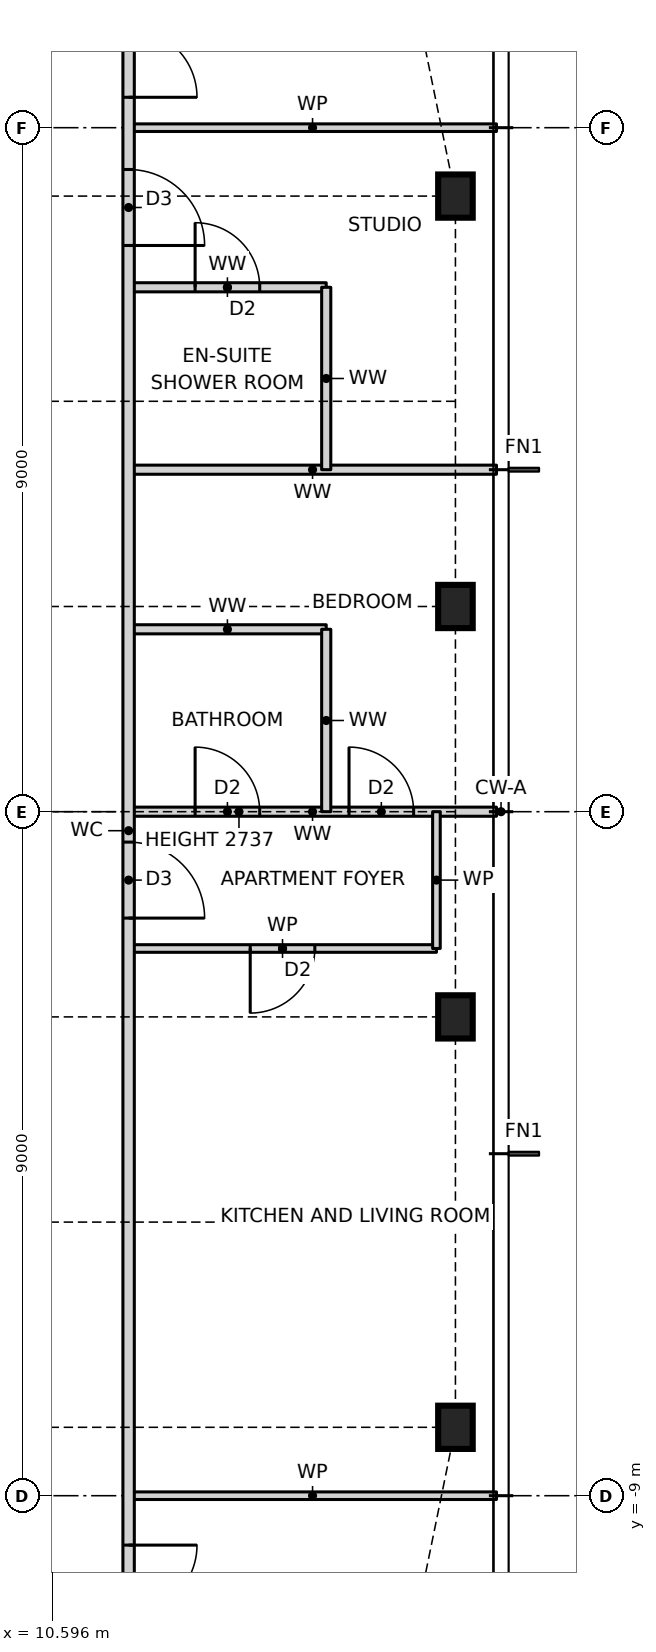
"""IFC4 building model, lengths in metres.
Left out: names, types, materials, properties, quantities, classifications, styles, units other than length and angle.
Written with IfcOpenShell. Run it as: python <this file> out.ifc"""

import sys

from ifc_helpers import new_model, si_unit, direction, frame, frame_2d, origin, origin_2d, place, context, subcontext, project, spatial, rectangle, i_section, extrude, element, fill, save


model = new_model("IFC4")
c1 = context("Model", 3, precision=1e-05, world=origin(), true_north=direction((0.0, 1.0)))
c2 = subcontext(c1, "Body", "Model", "MODEL_VIEW")
j1 = project(units=[si_unit("LENGTHUNIT", "METRE"), si_unit("PLANEANGLEUNIT", "RADIAN")], contexts=[c1])
p1 = place(None, origin())
s1 = spatial("IfcSite", under=j1, at=p1, CompositionType="ELEMENT")
p2 = place(p1, origin())
s2 = spatial("IfcBuilding", under=s1, at=p2, CompositionType="ELEMENT")
p3 = place(p2, frame((0.0, 0.0, 229.0)))
s3 = spatial("IfcBuildingStorey", under=s2, at=p3, CompositionType="ELEMENT", Elevation=229.0)
for number, where, z_axis, x_axis in (
    (1, (15.9, -8.1, 0.0), (0.0, 0.0, 1.0), (1.0, 0.0, 0.0)),
    (2, (15.9, -2.7, 0.0), (0.0, 0.0, 1.0), (1.0, 0.0, 0.0)),
    (3, (15.9, 2.7, 0.0), (0.0, 0.0, 1.0), (1.0, 0.0, 0.0)),
    (4, (15.9, 8.1, 0.0), (0.0, 0.0, 1.0), (1.0, 0.0, 0.0)),
):
    element("IfcColumn", number, at=place(p3, frame(where, z_axis=z_axis, x_axis=x_axis)), inside=s3, PredefinedType="COLUMN", context=c2, shape_type="SweptSolid", body=[
        extrude(i_section(OverallWidth=0.455, OverallDepth=0.569, WebThickness=0.078, FlangeThickness=0.125, at=origin_2d()), origin(), (0.0, 0.0, 1.0), 3.5),
    ])
p4 = place(p3, frame((11.6, -9.0, 0.0), z_axis=(0.0, 0.0, 1.0), x_axis=(1.0, 0.0, 0.0)))
e5 = element("IfcWall", 5, at=p4, inside=s3, PredefinedType="PARTITIONING", context=c2, shape_type="SweptSolid", body=[
    extrude(rectangle(XDim=4.84, YDim=0.1, at=frame_2d((2.42, 0.0))), origin(), (0.0, 0.0, 1.0), 3.27),
])
p5 = place(p3, frame((11.6, -1.8, 0.0), z_axis=(0.0, 0.0, 1.0), x_axis=(1.0, 0.0, 0.0)))
e6 = element("IfcWall", 6, at=p5, inside=s3, PredefinedType="PARTITIONING", context=c2, shape_type="SweptSolid", body=[
    extrude(rectangle(XDim=4.05, YDim=0.1, at=frame_2d((2.025, 0.0))), origin(), (0.0, 0.0, 1.0), 3.27),
])
p6 = place(p5, frame((1.6, 0.0, 0.0)))
e7 = element("IfcOpeningElement", 7, at=p6, cuts=e6, PredefinedType="OPENING", context=c2, shape_type="SweptSolid", body=[
    extrude(rectangle(XDim=0.85, YDim=2.1, at=frame_2d((0.425, 1.05))), frame((0.0, 0.06, 0.0), z_axis=(0.0, -1.0, 0.0), x_axis=(1.0, 0.0, 0.0)), (0.0, 0.0, 1.0), 0.12),
])
p7 = place(p3, frame((11.6, 0.0, 0.0), z_axis=(0.0, 0.0, 1.0), x_axis=(1.0, 0.0, 0.0)))
e8 = element("IfcWall", 8, at=p7, inside=s3, PredefinedType="PARTITIONING", context=c2, shape_type="SweptSolid", body=[
    extrude(rectangle(XDim=4.84, YDim=0.12, at=frame_2d((2.42, 0.0))), origin(), (0.0, 0.0, 1.0), 2.737),
])
p8 = place(p7, frame((2.9, 0.0, 0.0)))
e9 = element("IfcOpeningElement", 9, at=p8, cuts=e8, PredefinedType="OPENING", context=c2, shape_type="SweptSolid", body=[
    extrude(rectangle(XDim=0.85, YDim=2.1, at=frame_2d((0.425, 1.05))), frame((0.0, 0.07, 0.0), z_axis=(0.0, -1.0, 0.0), x_axis=(1.0, 0.0, 0.0)), (0.0, 0.0, 1.0), 0.14),
])
p9 = place(p7, frame((0.875, 0.0, 0.0)))
e10 = element("IfcOpeningElement", 10, at=p9, cuts=e8, PredefinedType="OPENING", context=c2, shape_type="SweptSolid", body=[
    extrude(rectangle(XDim=0.85, YDim=2.1, at=frame_2d((0.425, 1.05))), frame((0.0, 0.07, 0.0), z_axis=(0.0, -1.0, 0.0), x_axis=(1.0, 0.0, 0.0)), (0.0, 0.0, 1.0), 0.14),
])
p10 = place(p3, frame((11.6, 2.4, 0.0), z_axis=(0.0, 0.0, 1.0), x_axis=(1.0, 0.0, 0.0)))
e11 = element("IfcWall", 11, at=p10, inside=s3, PredefinedType="PARTITIONING", context=c2, shape_type="SweptSolid", body=[
    extrude(rectangle(XDim=2.6, YDim=0.12, at=frame_2d((1.3, 0.0))), origin(), (0.0, 0.0, 1.0), 3.27),
])
p11 = place(p3, frame((11.6, 4.5, 0.0), z_axis=(0.0, 0.0, 1.0), x_axis=(1.0, 0.0, 0.0)))
e12 = element("IfcWall", 12, at=p11, inside=s3, PredefinedType="PARTITIONING", context=c2, shape_type="SweptSolid", body=[
    extrude(rectangle(XDim=4.84, YDim=0.12, at=frame_2d((2.42, 0.0))), origin(), (0.0, 0.0, 1.0), 3.27),
])
p12 = place(p3, frame((11.6, 6.9, 0.0), z_axis=(0.0, 0.0, 1.0), x_axis=(1.0, 0.0, 0.0)))
e13 = element("IfcWall", 13, at=p12, inside=s3, PredefinedType="PARTITIONING", context=c2, shape_type="SweptSolid", body=[
    extrude(rectangle(XDim=2.6, YDim=0.12, at=frame_2d((1.3, 0.0))), origin(), (0.0, 0.0, 1.0), 3.27),
])
p13 = place(p12, frame((0.875, 0.0, 0.0)))
e14 = element("IfcOpeningElement", 14, at=p13, cuts=e13, PredefinedType="OPENING", context=c2, shape_type="SweptSolid", body=[
    extrude(rectangle(XDim=0.85, YDim=2.1, at=frame_2d((0.425, 1.05))), frame((0.0, 0.07, 0.0), z_axis=(0.0, -1.0, 0.0), x_axis=(1.0, 0.0, 0.0)), (0.0, 0.0, 1.0), 0.14),
])
p14 = place(p3, frame((11.6, 9.0, 0.0), z_axis=(0.0, 0.0, 1.0), x_axis=(1.0, 0.0, 0.0)))
e15 = element("IfcWall", 15, at=p14, inside=s3, PredefinedType="PARTITIONING", context=c2, shape_type="SweptSolid", body=[
    extrude(rectangle(XDim=4.84, YDim=0.1, at=frame_2d((2.42, 0.0))), origin(), (0.0, 0.0, 1.0), 3.27),
])
p15 = place(p3, frame((15.65, -1.8, 0.0), z_axis=(0.0, 0.0, 1.0), x_axis=(0.0, 1.0, 0.0)))
e16 = element("IfcWall", 16, at=p15, inside=s3, PredefinedType="PARTITIONING", context=c2, shape_type="SweptSolid", body=[
    extrude(rectangle(XDim=1.8, YDim=0.1, at=frame_2d((0.9, 0.0))), origin(), (0.0, 0.0, 1.0), 3.27),
])
for number, where, z_axis, x_axis in (
    (17, (14.2, 0.0, 0.0), (0.0, 0.0, 1.0), (0.0, 1.0, 0.0)),
    (18, (14.2, 4.5, 0.0), (0.0, 0.0, 1.0), (0.0, 1.0, 0.0)),
):
    element("IfcWall", number, at=place(p3, frame(where, z_axis=z_axis, x_axis=x_axis)), inside=s3, PredefinedType="PARTITIONING", context=c2, shape_type="SweptSolid", body=[
        extrude(rectangle(XDim=2.4, YDim=0.12, at=frame_2d((1.2, 0.0))), origin(), (0.0, 0.0, 1.0), 3.27),
    ])
p16 = place(p3, frame((11.6, -12.1, 0.0), z_axis=(0.0, 0.0, 1.0), x_axis=(0.0, 1.0, 0.0)))
e19 = element("IfcWall", 19, at=p16, inside=s3, PredefinedType="PARTITIONING", context=c2, shape_type="SweptSolid", body=[
    extrude(rectangle(XDim=23.7, YDim=0.15, at=frame_2d((11.85, 0.0))), origin(), (0.0, 0.0, 1.0), 3.27),
])
p17 = place(p16, frame((10.7, 0.0, 0.0)))
e20 = element("IfcOpeningElement", 20, at=p17, cuts=e19, PredefinedType="OPENING", context=c2, shape_type="SweptSolid", body=[
    extrude(rectangle(XDim=1.0, YDim=2.1, at=frame_2d((0.5, 1.05))), frame((0.0, 0.085, 0.0), z_axis=(0.0, -1.0, 0.0), x_axis=(1.0, 0.0, 0.0)), (0.0, 0.0, 1.0), 0.17),
])
p18 = place(p16, frame((19.55, 0.0, 0.0)))
e21 = element("IfcOpeningElement", 21, at=p18, cuts=e19, PredefinedType="OPENING", context=c2, shape_type="SweptSolid", body=[
    extrude(rectangle(XDim=1.0, YDim=2.1, at=frame_2d((0.5, 1.05))), frame((0.0, 0.085, 0.0), z_axis=(0.0, -1.0, 0.0), x_axis=(1.0, 0.0, 0.0)), (0.0, 0.0, 1.0), 0.17),
])
p19 = place(p16, frame((21.5, 0.0, 0.0)))
e22 = element("IfcOpeningElement", 22, at=p19, cuts=e19, PredefinedType="OPENING", context=c2, shape_type="SweptSolid", body=[
    extrude(rectangle(XDim=1.8, YDim=2.1, at=frame_2d((0.9, 1.05))), frame((0.0, 0.085, 0.0), z_axis=(0.0, -1.0, 0.0), x_axis=(1.0, 0.0, 0.0)), (0.0, 0.0, 1.0), 0.17),
])
p20 = place(p16, frame((0.65, 0.0, 0.0)))
e23 = element("IfcOpeningElement", 23, at=p20, cuts=e19, PredefinedType="OPENING", context=c2, shape_type="SweptSolid", body=[
    extrude(rectangle(XDim=1.8, YDim=2.1, at=frame_2d((0.9, 1.05))), frame((0.0, 0.085, 0.0), z_axis=(0.0, -1.0, 0.0), x_axis=(1.0, 0.0, 0.0)), (0.0, 0.0, 1.0), 0.17),
])
p21 = place(p17, frame((1.0, 0.0, 0.0), z_axis=(0.0, 0.0, 1.0), x_axis=(-1.0, 0.0, 0.0)))
e24 = element("IfcDoor", 24, at=p21, inside=s3, OperationType="SINGLE_SWING_RIGHT", PredefinedType="DOOR", context=c2, shape_type="SweptSolid", body=[
    extrude(rectangle(XDim=1.0, YDim=2.1, at=frame_2d((0.5, 1.05))), frame((0.0, 0.025, 0.0), z_axis=(0.0, -1.0, 0.0), x_axis=(1.0, 0.0, 0.0)), (0.0, 0.0, 1.0), 0.05),
])
fill(e20, e24)
p22 = place(p6, frame((0.85, 0.0, 0.0), z_axis=(0.0, 0.0, 1.0), x_axis=(-1.0, 0.0, 0.0)))
e25 = element("IfcDoor", 25, at=p22, inside=s3, OperationType="SINGLE_SWING_RIGHT", PredefinedType="DOOR", context=c2, shape_type="SweptSolid", body=[
    extrude(rectangle(XDim=0.85, YDim=2.1, at=frame_2d((0.425, 1.05))), frame((0.0, 0.025, 0.0), z_axis=(0.0, -1.0, 0.0), x_axis=(1.0, 0.0, 0.0)), (0.0, 0.0, 1.0), 0.05),
])
fill(e7, e25)
p23 = place(p8, origin())
e26 = element("IfcDoor", 26, at=p23, inside=s3, OperationType="SINGLE_SWING_LEFT", PredefinedType="DOOR", context=c2, shape_type="SweptSolid", body=[
    extrude(rectangle(XDim=0.85, YDim=2.1, at=frame_2d((0.425, 1.05))), frame((0.0, 0.025, 0.0), z_axis=(0.0, -1.0, 0.0), x_axis=(1.0, 0.0, 0.0)), (0.0, 0.0, 1.0), 0.05),
])
fill(e9, e26)
p24 = place(p9, origin())
e27 = element("IfcDoor", 27, at=p24, inside=s3, OperationType="SINGLE_SWING_LEFT", PredefinedType="DOOR", context=c2, shape_type="SweptSolid", body=[
    extrude(rectangle(XDim=0.85, YDim=2.1, at=frame_2d((0.425, 1.05))), frame((0.0, 0.025, 0.0), z_axis=(0.0, -1.0, 0.0), x_axis=(1.0, 0.0, 0.0)), (0.0, 0.0, 1.0), 0.05),
])
fill(e10, e27)
p25 = place(p18, frame((1.0, 0.0, 0.0), z_axis=(0.0, 0.0, 1.0), x_axis=(-1.0, 0.0, 0.0)))
e28 = element("IfcDoor", 28, at=p25, inside=s3, OperationType="SINGLE_SWING_RIGHT", PredefinedType="DOOR", context=c2, shape_type="SweptSolid", body=[
    extrude(rectangle(XDim=1.0, YDim=2.1, at=frame_2d((0.5, 1.05))), frame((0.0, 0.025, 0.0), z_axis=(0.0, -1.0, 0.0), x_axis=(1.0, 0.0, 0.0)), (0.0, 0.0, 1.0), 0.05),
])
fill(e21, e28)
p26 = place(p13, origin())
e29 = element("IfcDoor", 29, at=p26, inside=s3, OperationType="SINGLE_SWING_LEFT", PredefinedType="DOOR", context=c2, shape_type="SweptSolid", body=[
    extrude(rectangle(XDim=0.85, YDim=2.1, at=frame_2d((0.425, 1.05))), frame((0.0, 0.025, 0.0), z_axis=(0.0, -1.0, 0.0), x_axis=(1.0, 0.0, 0.0)), (0.0, 0.0, 1.0), 0.05),
])
fill(e14, e29)
p27 = place(p19, frame((1.8, 0.0, 0.0), z_axis=(0.0, 0.0, 1.0), x_axis=(-1.0, 0.0, 0.0)))
e30 = element("IfcDoor", 30, at=p27, inside=s3, OperationType="DOUBLE_DOOR_SINGLE_SWING", PredefinedType="DOOR", context=c2, shape_type="SweptSolid", body=[
    extrude(rectangle(XDim=1.8, YDim=2.1, at=frame_2d((0.9, 1.05))), frame((0.0, 0.025, 0.0), z_axis=(0.0, -1.0, 0.0), x_axis=(1.0, 0.0, 0.0)), (0.0, 0.0, 1.0), 0.05),
])
fill(e22, e30)
p28 = place(p20, frame((1.8, 0.0, 0.0), z_axis=(0.0, 0.0, 1.0), x_axis=(-1.0, 0.0, 0.0)))
e31 = element("IfcDoor", 31, at=p28, inside=s3, OperationType="DOUBLE_DOOR_SINGLE_SWING", PredefinedType="DOOR", context=c2, shape_type="SweptSolid", body=[
    extrude(rectangle(XDim=1.8, YDim=2.1, at=frame_2d((0.9, 1.05))), frame((0.0, 0.025, 0.0), z_axis=(0.0, -1.0, 0.0), x_axis=(1.0, 0.0, 0.0)), (0.0, 0.0, 1.0), 0.05),
])
fill(e23, e31)
save(model, sys.argv[1])
